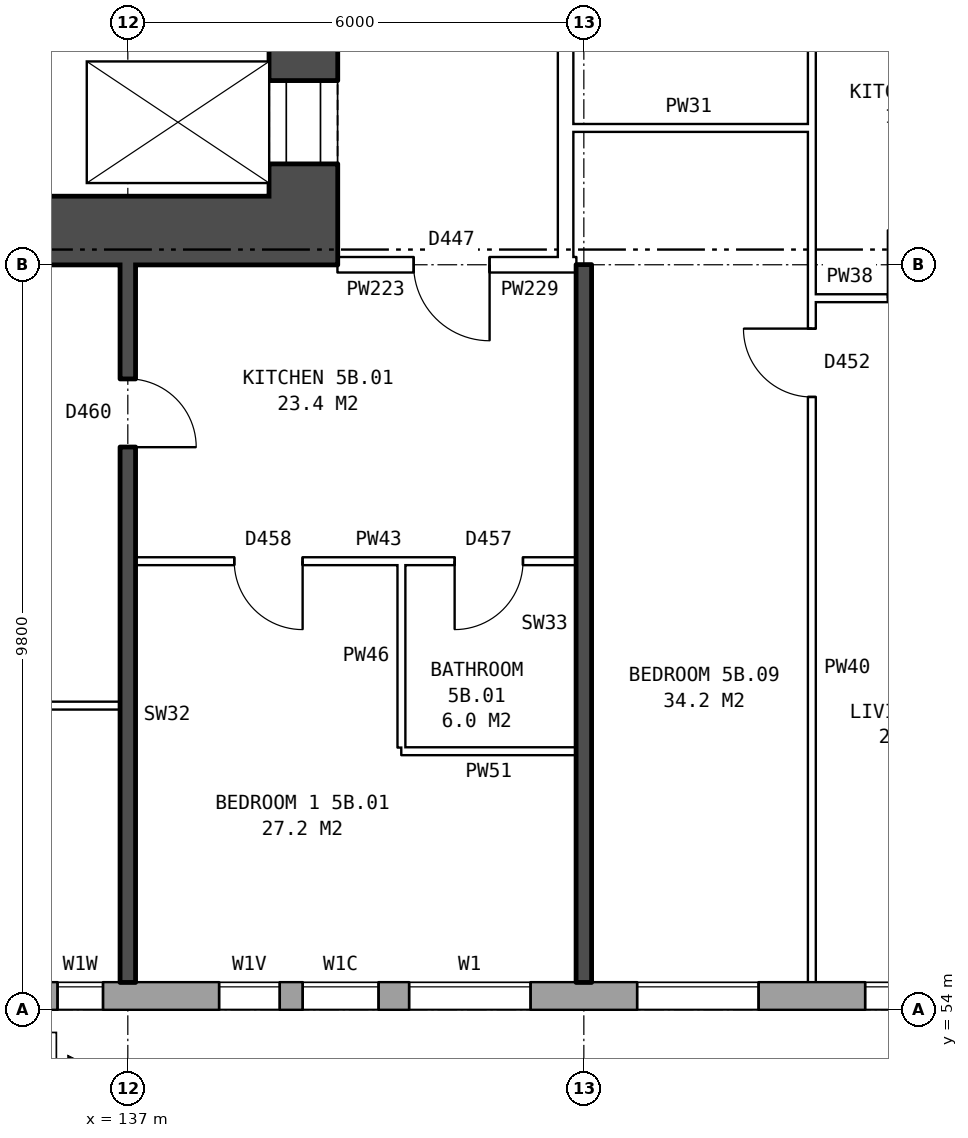
"""IFC4 building model, lengths in metres.
Left out: names, types, materials, properties, quantities, classifications, styles, units other than length and angle.
Written with IfcOpenShell. Run it as: python <this file> out.ifc"""

import sys

from ifc_helpers import new_model, si_unit, direction, frame, frame_2d, origin, place, context, subcontext, project, spatial, rectangle, extrude, element, fill, save


model = new_model("IFC4")
c1 = context("Model", 3, precision=1e-05, world=origin(), true_north=direction((0.0, 1.0)))
c2 = subcontext(c1, "Body", "Model", "MODEL_VIEW")
j1 = project(units=[si_unit("LENGTHUNIT", "METRE"), si_unit("PLANEANGLEUNIT", "RADIAN")], contexts=[c1])
p1 = place(None, origin())
s1 = spatial("IfcSite", under=j1, at=p1, CompositionType="ELEMENT")
p2 = place(p1, origin())
s2 = spatial("IfcBuilding", under=s1, at=p2, CompositionType="ELEMENT")
p3 = place(p2, frame((0.0, 0.0, 22.6)))
s3 = spatial("IfcBuildingStorey", under=s2, at=p3, CompositionType="ELEMENT", Elevation=22.6)
p4 = place(p3, frame((134.075, 54.18, 0.0), z_axis=(0.0, 0.0, 1.0), x_axis=(1.0, 0.0, 0.0)))
e1 = element("IfcWall", 1, at=p4, inside=s3, PredefinedType="STANDARD", context=c2, shape_type="SweptSolid", body=[
    extrude(rectangle(XDim=40.601, YDim=0.36, at=frame_2d((20.3, 0.0))), origin(), (0.0, 0.0, 1.0), 2.85),
])
p5 = place(p4, frame((0.3, 0.0, 0.8)))
e2 = element("IfcOpeningElement", 2, at=p5, cuts=e1, PredefinedType="OPENING", context=c2, shape_type="SweptSolid", body=[
    extrude(rectangle(XDim=1.4, YDim=1.8, at=frame_2d((0.7, 0.9))), frame((0.0, 0.19, 0.0), z_axis=(0.0, -1.0, 0.0), x_axis=(1.0, 0.0, 0.0)), (0.0, 0.0, 1.0), 0.38),
])
p6 = place(p4, frame((4.125, 0.0, 0.8)))
e3 = element("IfcOpeningElement", 3, at=p6, cuts=e1, PredefinedType="OPENING", context=c2, shape_type="SweptSolid", body=[
    extrude(rectangle(XDim=0.8, YDim=0.9, at=frame_2d((0.4, 0.45))), frame((0.0, 0.19, 0.0), z_axis=(0.0, -1.0, 0.0), x_axis=(1.0, 0.0, 0.0)), (0.0, 0.0, 1.0), 0.38),
])
p7 = place(p4, frame((6.625, 0.0, 0.8)))
e4 = element("IfcOpeningElement", 4, at=p7, cuts=e1, PredefinedType="OPENING", context=c2, shape_type="SweptSolid", body=[
    extrude(rectangle(XDim=1.6, YDim=1.8, at=frame_2d((0.8, 0.9))), frame((0.0, 0.19, 0.0), z_axis=(0.0, -1.0, 0.0), x_axis=(1.0, 0.0, 0.0)), (0.0, 0.0, 1.0), 0.38),
])
p8 = place(p4, frame((9.625, 0.0, 0.8)))
e5 = element("IfcOpeningElement", 5, at=p8, cuts=e1, PredefinedType="OPENING", context=c2, shape_type="SweptSolid", body=[
    extrude(rectangle(XDim=1.6, YDim=1.8, at=frame_2d((0.8, 0.9))), frame((0.0, 0.19, 0.0), z_axis=(0.0, -1.0, 0.0), x_axis=(1.0, 0.0, 0.0)), (0.0, 0.0, 1.0), 0.38),
])
p9 = place(p4, frame((12.625, 0.0, 0.8)))
e6 = element("IfcOpeningElement", 6, at=p9, cuts=e1, PredefinedType="OPENING", context=c2, shape_type="SweptSolid", body=[
    extrude(rectangle(XDim=1.6, YDim=1.8, at=frame_2d((0.8, 0.9))), frame((0.0, 0.19, 0.0), z_axis=(0.0, -1.0, 0.0), x_axis=(1.0, 0.0, 0.0)), (0.0, 0.0, 1.0), 0.38),
])
p10 = place(p4, frame((15.625, 0.0, 0.8)))
e7 = element("IfcOpeningElement", 7, at=p10, cuts=e1, PredefinedType="OPENING", context=c2, shape_type="SweptSolid", body=[
    extrude(rectangle(XDim=1.6, YDim=1.8, at=frame_2d((0.8, 0.9))), frame((0.0, 0.19, 0.0), z_axis=(0.0, -1.0, 0.0), x_axis=(1.0, 0.0, 0.0)), (0.0, 0.0, 1.0), 0.38),
])
p11 = place(p4, frame((18.625, 0.0, 0.8)))
e8 = element("IfcOpeningElement", 8, at=p11, cuts=e1, PredefinedType="OPENING", context=c2, shape_type="SweptSolid", body=[
    extrude(rectangle(XDim=1.6, YDim=1.8, at=frame_2d((0.8, 0.9))), frame((0.0, 0.19, 0.0), z_axis=(0.0, -1.0, 0.0), x_axis=(1.0, 0.0, 0.0)), (0.0, 0.0, 1.0), 0.38),
])
p12 = place(p4, frame((21.625, 0.0, 0.8)))
e9 = element("IfcOpeningElement", 9, at=p12, cuts=e1, PredefinedType="OPENING", context=c2, shape_type="SweptSolid", body=[
    extrude(rectangle(XDim=1.6, YDim=1.8, at=frame_2d((0.8, 0.9))), frame((0.0, 0.19, 0.0), z_axis=(0.0, -1.0, 0.0), x_axis=(1.0, 0.0, 0.0)), (0.0, 0.0, 1.0), 0.38),
])
p13 = place(p4, frame((24.625, 0.0, 0.8)))
e10 = element("IfcOpeningElement", 10, at=p13, cuts=e1, PredefinedType="OPENING", context=c2, shape_type="SweptSolid", body=[
    extrude(rectangle(XDim=1.6, YDim=1.8, at=frame_2d((0.8, 0.9))), frame((0.0, 0.19, 0.0), z_axis=(0.0, -1.0, 0.0), x_axis=(1.0, 0.0, 0.0)), (0.0, 0.0, 1.0), 0.38),
])
p14 = place(p4, frame((27.625, 0.0, 0.8)))
e11 = element("IfcOpeningElement", 11, at=p14, cuts=e1, PredefinedType="OPENING", context=c2, shape_type="SweptSolid", body=[
    extrude(rectangle(XDim=1.6, YDim=1.8, at=frame_2d((0.8, 0.9))), frame((0.0, 0.19, 0.0), z_axis=(0.0, -1.0, 0.0), x_axis=(1.0, 0.0, 0.0)), (0.0, 0.0, 1.0), 0.38),
])
p15 = place(p4, frame((30.625, 0.0, 0.8)))
e12 = element("IfcOpeningElement", 12, at=p15, cuts=e1, PredefinedType="OPENING", context=c2, shape_type="SweptSolid", body=[
    extrude(rectangle(XDim=1.6, YDim=1.8, at=frame_2d((0.8, 0.9))), frame((0.0, 0.19, 0.0), z_axis=(0.0, -1.0, 0.0), x_axis=(1.0, 0.0, 0.0)), (0.0, 0.0, 1.0), 0.38),
])
p16 = place(p4, frame((33.625, 0.0, 0.8)))
e13 = element("IfcOpeningElement", 13, at=p16, cuts=e1, PredefinedType="OPENING", context=c2, shape_type="SweptSolid", body=[
    extrude(rectangle(XDim=1.6, YDim=1.8, at=frame_2d((0.8, 0.9))), frame((0.0, 0.19, 0.0), z_axis=(0.0, -1.0, 0.0), x_axis=(1.0, 0.0, 0.0)), (0.0, 0.0, 1.0), 0.38),
])
p17 = place(p4, frame((35.525, 0.0, 0.8)))
e14 = element("IfcOpeningElement", 14, at=p17, cuts=e1, PredefinedType="OPENING", context=c2, shape_type="SweptSolid", body=[
    extrude(rectangle(XDim=0.6, YDim=1.2, at=frame_2d((0.3, 0.6))), frame((0.0, 0.19, 0.0), z_axis=(0.0, -1.0, 0.0), x_axis=(1.0, 0.0, 0.0)), (0.0, 0.0, 1.0), 0.38),
])
p18 = place(p4, frame((2.0, 0.0, 1.5)))
e15 = element("IfcOpeningElement", 15, at=p18, cuts=e1, PredefinedType="OPENING", context=c2, shape_type="SweptSolid", body=[
    extrude(rectangle(XDim=0.6, YDim=0.9, at=frame_2d((0.3, 0.45))), frame((0.0, 0.19, 0.0), z_axis=(0.0, -1.0, 0.0), x_axis=(1.0, 0.0, 0.0)), (0.0, 0.0, 1.0), 0.38),
])
p19 = place(p4, frame((5.225, 0.0, 0.8)))
e16 = element("IfcOpeningElement", 16, at=p19, cuts=e1, PredefinedType="OPENING", context=c2, shape_type="SweptSolid", body=[
    extrude(rectangle(XDim=1.0, YDim=1.8, at=frame_2d((0.5, 0.9))), frame((0.0, 0.19, 0.0), z_axis=(0.0, -1.0, 0.0), x_axis=(1.0, 0.0, 0.0)), (0.0, 0.0, 1.0), 0.38),
])
p20 = place(p4, frame((37.725, 0.0, 1.7)))
e17 = element("IfcOpeningElement", 17, at=p20, cuts=e1, PredefinedType="OPENING", context=c2, shape_type="SweptSolid", body=[
    extrude(rectangle(XDim=1.0, YDim=0.9, at=frame_2d((0.5, 0.45))), frame((0.0, 0.19, 0.0), z_axis=(0.0, -1.0, 0.0), x_axis=(1.0, 0.0, 0.0)), (0.0, 0.0, 1.0), 0.38),
])
p21 = place(p3, frame((139.31, 64.7, 0.0), z_axis=(0.0, 0.0, 1.0), x_axis=(0.0, 1.0, 0.0)))
e18 = element("IfcWall", 18, at=p21, inside=s3, PredefinedType="SHEAR", context=c2, shape_type="SweptSolid", body=[
    extrude(rectangle(XDim=10.6, YDim=0.9, at=frame_2d((5.3, 0.0))), origin(), (0.0, 0.0, 1.0), 2.85),
])
p22 = place(p21, frame((0.425, 0.0, 0.0)))
e19 = element("IfcOpeningElement", 19, at=p22, cuts=e18, PredefinedType="OPENING", context=c2, shape_type="SweptSolid", body=[
    extrude(rectangle(XDim=1.1, YDim=2.1, at=frame_2d((0.55, 1.05))), frame((0.0, 0.46, 0.0), z_axis=(0.0, -1.0, 0.0), x_axis=(1.0, 0.0, 0.0)), (0.0, 0.0, 1.0), 0.92),
])
p23 = place(p21, frame((9.0, 0.0, 0.0)))
e20 = element("IfcOpeningElement", 20, at=p23, cuts=e18, PredefinedType="OPENING", context=c2, shape_type="SweptSolid", body=[
    extrude(rectangle(XDim=1.1, YDim=2.1, at=frame_2d((0.55, 1.05))), frame((0.0, 0.46, 0.0), z_axis=(0.0, -1.0, 0.0), x_axis=(1.0, 0.0, 0.0)), (0.0, 0.0, 1.0), 0.92),
])
p24 = place(p21, frame((7.225, 0.0, 0.0)))
e21 = element("IfcOpeningElement", 21, at=p24, cuts=e18, PredefinedType="OPENING", context=c2, shape_type="SweptSolid", body=[
    extrude(rectangle(XDim=0.85, YDim=2.1, at=frame_2d((0.425, 1.05))), frame((0.0, 0.46, 0.0), z_axis=(0.0, -1.0, 0.0), x_axis=(1.0, 0.0, 0.0)), (0.0, 0.0, 1.0), 0.92),
])
p25 = place(p3, frame((139.76, 64.25, 0.0), z_axis=(0.0, 0.0, 1.0), x_axis=(-1.0, 0.0, 0.0)))
e22 = element("IfcWall", 22, at=p25, inside=s3, PredefinedType="SHEAR", context=c2, shape_type="SweptSolid", body=[
    extrude(rectangle(XDim=8.4, YDim=0.9, at=frame_2d((4.2, 0.0))), origin(), (0.0, 0.0, 1.0), 2.85),
])
p26 = place(p3, frame((142.76, 63.9, 0.0), z_axis=(0.0, 0.0, 1.0), x_axis=(0.0, 1.0, 0.0)))
e23 = element("IfcWall", 23, at=p26, inside=s3, PredefinedType="PARTITIONING", context=c2, shape_type="SweptSolid", body=[
    extrude(rectangle(XDim=12.2, YDim=0.2, at=frame_2d((6.1, 0.0))), origin(), (0.0, 0.0, 1.0), 2.85),
])
p27 = place(p26, frame((5.1, 0.0, 0.0)))
e24 = element("IfcOpeningElement", 24, at=p27, cuts=e23, PredefinedType="OPENING", context=c2, shape_type="SweptSolid", body=[
    extrude(rectangle(XDim=2.0, YDim=2.1, at=frame_2d((1.0, 1.05))), frame((0.0, 0.11, 0.0), z_axis=(0.0, -1.0, 0.0), x_axis=(1.0, 0.0, 0.0)), (0.0, 0.0, 1.0), 0.22),
])
p28 = place(p3, frame((140.6, 57.4, 0.0), z_axis=(0.0, 0.0, 1.0), x_axis=(1.0, 0.0, 0.0)))
e25 = element("IfcWall", 25, at=p28, inside=s3, PredefinedType="PARTITIONING", context=c2, shape_type="SweptSolid", body=[
    extrude(rectangle(XDim=2.3, YDim=0.1, at=frame_2d((1.15, 0.0))), origin(), (0.0, 0.0, 1.0), 2.85),
])
p29 = place(p3, frame((131.36, 58.0, 0.0), z_axis=(0.0, 0.0, 1.0), x_axis=(1.0, 0.0, 0.0)))
e26 = element("IfcWall", 26, at=p29, inside=s3, PredefinedType="PARTITIONING", context=c2, shape_type="SweptSolid", body=[
    extrude(rectangle(XDim=5.54, YDim=0.1, at=frame_2d((2.77, 0.0))), origin(), (0.0, 0.0, 1.0), 2.85),
])
p30 = place(p29, frame((2.32, 0.0, 0.0)))
e27 = element("IfcOpeningElement", 27, at=p30, cuts=e26, PredefinedType="OPENING", context=c2, shape_type="SweptSolid", body=[
    extrude(rectangle(XDim=0.9, YDim=2.1, at=frame_2d((0.45, 1.05))), frame((0.0, 0.06, 0.0), z_axis=(0.0, -1.0, 0.0), x_axis=(1.0, 0.0, 0.0)), (0.0, 0.0, 1.0), 0.12),
])
p31 = place(p3, frame((137.1, 59.9, 0.0), z_axis=(0.0, 0.0, 1.0), x_axis=(1.0, 0.0, 0.0)))
e28 = element("IfcWall", 28, at=p31, inside=s3, PredefinedType="PARTITIONING", context=c2, shape_type="SweptSolid", body=[
    extrude(rectangle(XDim=5.8, YDim=0.1, at=frame_2d((2.9, 0.0))), origin(), (0.0, 0.0, 1.0), 2.85),
])
p32 = place(p31, frame((1.3, 0.0, 0.0)))
e29 = element("IfcOpeningElement", 29, at=p32, cuts=e28, PredefinedType="OPENING", context=c2, shape_type="SweptSolid", body=[
    extrude(rectangle(XDim=0.9, YDim=2.1, at=frame_2d((0.45, 1.05))), frame((0.0, 0.06, 0.0), z_axis=(0.0, -1.0, 0.0), x_axis=(1.0, 0.0, 0.0)), (0.0, 0.0, 1.0), 0.12),
])
p33 = place(p31, frame((4.2, 0.0, 0.0)))
e30 = element("IfcOpeningElement", 30, at=p33, cuts=e28, PredefinedType="OPENING", context=c2, shape_type="SweptSolid", body=[
    extrude(rectangle(XDim=0.9, YDim=2.1, at=frame_2d((0.45, 1.05))), frame((0.0, 0.06, 0.0), z_axis=(0.0, -1.0, 0.0), x_axis=(1.0, 0.0, 0.0)), (0.0, 0.0, 1.0), 0.12),
])
p34 = place(p3, frame((146.0, 63.36, 0.0), z_axis=(0.0, 0.0, 1.0), x_axis=(1.0, 0.0, 0.0)))
e31 = element("IfcWall", 31, at=p34, inside=s3, PredefinedType="PARTITIONING", context=c2, shape_type="SweptSolid", body=[
    extrude(rectangle(XDim=2.9, YDim=0.1, at=frame_2d((1.45, 0.0))), origin(), (0.0, 0.0, 1.0), 2.85),
])
p35 = place(p34, frame((1.0, 0.0, 0.0)))
e32 = element("IfcOpeningElement", 32, at=p35, cuts=e31, PredefinedType="OPENING", context=c2, shape_type="SweptSolid", body=[
    extrude(rectangle(XDim=0.9, YDim=2.1, at=frame_2d((0.45, 1.05))), frame((0.0, 0.06, 0.0), z_axis=(0.0, -1.0, 0.0), x_axis=(1.0, 0.0, 0.0)), (0.0, 0.0, 1.0), 0.12),
])
p36 = place(p3, frame((139.76, 63.8, 0.0), z_axis=(0.0, 0.0, 1.0), x_axis=(1.0, 0.0, 0.0)))
e33 = element("IfcWall", 33, at=p36, inside=s3, PredefinedType="PARTITIONING", context=c2, shape_type="SweptSolid", body=[
    extrude(rectangle(XDim=3.0, YDim=0.2, at=frame_2d((1.5, 0.0))), origin(), (0.0, 0.0, 1.0), 2.85),
])
p37 = place(p36, frame((1.0, 0.0, 0.0)))
e34 = element("IfcOpeningElement", 34, at=p37, cuts=e33, PredefinedType="OPENING", context=c2, shape_type="SweptSolid", body=[
    extrude(rectangle(XDim=1.0, YDim=2.1, at=frame_2d((0.5, 1.05))), frame((0.0, 0.11, 0.0), z_axis=(0.0, -1.0, 0.0), x_axis=(1.0, 0.0, 0.0)), (0.0, 0.0, 1.0), 0.22),
])
p38 = place(p3, frame((142.76, 63.8, 0.0), z_axis=(0.0, 0.0, 1.0), x_axis=(1.0, 0.0, 0.0)))
e35 = element("IfcWall", 35, at=p38, inside=s3, PredefinedType="PARTITIONING", context=c2, shape_type="SweptSolid", body=[
    extrude(rectangle(XDim=0.14, YDim=0.2, at=frame_2d((0.07, 0.0))), origin(), (0.0, 0.0, 1.0), 2.85),
])
p39 = place(p3, frame((142.76, 65.6, 0.0), z_axis=(0.0, 0.0, 1.0), x_axis=(1.0, 0.0, 0.0)))
e36 = element("IfcWall", 36, at=p39, inside=s3, PredefinedType="PARTITIONING", context=c2, shape_type="SweptSolid", body=[
    extrude(rectangle(XDim=3.24, YDim=0.1, at=frame_2d((1.62, 0.0))), origin(), (0.0, 0.0, 1.0), 2.85),
])
p40 = place(p3, frame((137.0, 54.36, 0.0), z_axis=(0.0, 0.0, 1.0), x_axis=(0.0, 1.0, 0.0)))
e37 = element("IfcWall", 37, at=p40, inside=s3, PredefinedType="SOLIDWALL", context=c2, shape_type="SweptSolid", body=[
    extrude(rectangle(XDim=9.44, YDim=0.2, at=frame_2d((4.72, 0.0))), origin(), (0.0, 0.0, 1.0), 2.85),
])
p41 = place(p40, frame((7.04, 0.0, 0.0)))
e38 = element("IfcOpeningElement", 38, at=p41, cuts=e37, PredefinedType="OPENING", context=c2, shape_type="SweptSolid", body=[
    extrude(rectangle(XDim=0.9, YDim=2.1, at=frame_2d((0.45, 1.05))), frame((0.0, 0.11, 0.0), z_axis=(0.0, -1.0, 0.0), x_axis=(1.0, 0.0, 0.0)), (0.0, 0.0, 1.0), 0.22),
])
p42 = place(p3, frame((140.6, 57.45, 0.0), z_axis=(0.0, 0.0, 1.0), x_axis=(0.0, 1.0, 0.0)))
e39 = element("IfcWall", 39, at=p42, inside=s3, PredefinedType="PARTITIONING", context=c2, shape_type="SweptSolid", body=[
    extrude(rectangle(XDim=2.4, YDim=0.1, at=frame_2d((1.2, 0.0))), origin(), (0.0, 0.0, 1.0), 2.85),
])
p43 = place(p3, frame((143.0, 54.36, 0.0), z_axis=(0.0, 0.0, 1.0), x_axis=(0.0, 1.0, 0.0)))
e40 = element("IfcWall", 40, at=p43, inside=s3, PredefinedType="SOLIDWALL", context=c2, shape_type="SweptSolid", body=[
    extrude(rectangle(XDim=9.44, YDim=0.2, at=frame_2d((4.72, 0.0))), origin(), (0.0, 0.0, 1.0), 2.85),
])
p44 = place(p3, frame((146.0, 54.36, 0.0), z_axis=(0.0, 0.0, 1.0), x_axis=(0.0, 1.0, 0.0)))
e41 = element("IfcWall", 41, at=p44, inside=s3, PredefinedType="PARTITIONING", context=c2, shape_type="SweptSolid", body=[
    extrude(rectangle(XDim=14.34, YDim=0.1, at=frame_2d((7.17, 0.0))), origin(), (0.0, 0.0, 1.0), 2.85),
])
p45 = place(p44, frame((7.7, 0.0, 0.0)))
e42 = element("IfcOpeningElement", 42, at=p45, cuts=e41, PredefinedType="OPENING", context=c2, shape_type="SweptSolid", body=[
    extrude(rectangle(XDim=0.9, YDim=2.1, at=frame_2d((0.45, 1.05))), frame((0.0, 0.06, 0.0), z_axis=(0.0, -1.0, 0.0), x_axis=(1.0, 0.0, 0.0)), (0.0, 0.0, 1.0), 0.12),
])
p46 = place(p44, frame((13.04, 0.0, 0.0)))
e43 = element("IfcOpeningElement", 43, at=p46, cuts=e41, PredefinedType="OPENING", context=c2, shape_type="SweptSolid", body=[
    extrude(rectangle(XDim=0.9, YDim=2.1, at=frame_2d((0.45, 1.05))), frame((0.0, 0.06, 0.0), z_axis=(0.0, -1.0, 0.0), x_axis=(1.0, 0.0, 0.0)), (0.0, 0.0, 1.0), 0.12),
])
p47 = place(p6, origin())
e44 = element("IfcWindow", 44, at=p47, inside=s3, PartitioningType="SINGLE_PANEL", PredefinedType="WINDOW", context=c2, shape_type="SweptSolid", body=[
    extrude(rectangle(XDim=0.8, YDim=0.9, at=frame_2d((0.4, 0.45))), frame((0.0, 0.15, 0.0), z_axis=(0.0, -1.0, 0.0), x_axis=(1.0, 0.0, 0.0)), (0.0, 0.0, 1.0), 0.06),
])
fill(e3, e44)
p48 = place(p7, origin())
e45 = element("IfcWindow", 45, at=p48, inside=s3, PartitioningType="SINGLE_PANEL", PredefinedType="WINDOW", context=c2, shape_type="SweptSolid", body=[
    extrude(rectangle(XDim=1.6, YDim=1.8, at=frame_2d((0.8, 0.9))), frame((0.0, 0.15, 0.0), z_axis=(0.0, -1.0, 0.0), x_axis=(1.0, 0.0, 0.0)), (0.0, 0.0, 1.0), 0.06),
])
fill(e4, e45)
p49 = place(p8, origin())
e46 = element("IfcWindow", 46, at=p49, inside=s3, PartitioningType="SINGLE_PANEL", PredefinedType="WINDOW", context=c2, shape_type="SweptSolid", body=[
    extrude(rectangle(XDim=1.6, YDim=1.8, at=frame_2d((0.8, 0.9))), frame((0.0, 0.15, 0.0), z_axis=(0.0, -1.0, 0.0), x_axis=(1.0, 0.0, 0.0)), (0.0, 0.0, 1.0), 0.06),
])
fill(e5, e46)
p50 = place(p9, origin())
e47 = element("IfcWindow", 47, at=p50, inside=s3, PartitioningType="SINGLE_PANEL", PredefinedType="WINDOW", context=c2, shape_type="SweptSolid", body=[
    extrude(rectangle(XDim=1.6, YDim=1.8, at=frame_2d((0.8, 0.9))), frame((0.0, 0.15, 0.0), z_axis=(0.0, -1.0, 0.0), x_axis=(1.0, 0.0, 0.0)), (0.0, 0.0, 1.0), 0.06),
])
fill(e6, e47)
p51 = place(p22, origin())
e48 = element("IfcDoor", 48, at=p51, inside=s3, OperationType="DOUBLE_DOOR_SLIDING", PredefinedType="DOOR", context=c2, shape_type="SweptSolid", body=[
    extrude(rectangle(XDim=1.1, YDim=2.1, at=frame_2d((0.55, 1.05))), frame((0.0, 0.435, 0.0), z_axis=(0.0, -1.0, 0.0), x_axis=(1.0, 0.0, 0.0)), (0.0, 0.0, 1.0), 0.05),
])
fill(e19, e48)
p52 = place(p32, frame((0.9, 0.0, 0.0), z_axis=(0.0, 0.0, 1.0), x_axis=(-1.0, 0.0, 0.0)))
e49 = element("IfcDoor", 49, at=p52, inside=s3, OperationType="SINGLE_SWING_LEFT", PredefinedType="DOOR", context=c2, shape_type="SweptSolid", body=[
    extrude(rectangle(XDim=0.9, YDim=2.1, at=frame_2d((0.45, 1.05))), frame((0.0, 0.025, 0.0), z_axis=(0.0, -1.0, 0.0), x_axis=(1.0, 0.0, 0.0)), (0.0, 0.0, 1.0), 0.05),
])
fill(e29, e49)
p53 = place(p37, frame((1.0, 0.0, 0.0), z_axis=(0.0, 0.0, 1.0), x_axis=(-1.0, 0.0, 0.0)))
e50 = element("IfcDoor", 50, at=p53, inside=s3, OperationType="SINGLE_SWING_LEFT", PredefinedType="DOOR", context=c2, shape_type="SweptSolid", body=[
    extrude(rectangle(XDim=1.0, YDim=2.1, at=frame_2d((0.5, 1.05))), frame((0.0, 0.025, 0.0), z_axis=(0.0, -1.0, 0.0), x_axis=(1.0, 0.0, 0.0)), (0.0, 0.0, 1.0), 0.05),
])
fill(e34, e50)
p54 = place(p41, frame((0.9, 0.0, 0.0), z_axis=(0.0, 0.0, 1.0), x_axis=(-1.0, 0.0, 0.0)))
e51 = element("IfcDoor", 51, at=p54, inside=s3, OperationType="SINGLE_SWING_RIGHT", PredefinedType="DOOR", context=c2, shape_type="SweptSolid", body=[
    extrude(rectangle(XDim=0.9, YDim=2.1, at=frame_2d((0.45, 1.05))), frame((0.0, 0.025, 0.0), z_axis=(0.0, -1.0, 0.0), x_axis=(1.0, 0.0, 0.0)), (0.0, 0.0, 1.0), 0.05),
])
fill(e38, e51)
p55 = place(p33, frame((0.9, 0.0, 0.0), z_axis=(0.0, 0.0, 1.0), x_axis=(-1.0, 0.0, 0.0)))
e52 = element("IfcDoor", 52, at=p55, inside=s3, OperationType="SINGLE_SWING_RIGHT", PredefinedType="DOOR", context=c2, shape_type="SweptSolid", body=[
    extrude(rectangle(XDim=0.9, YDim=2.1, at=frame_2d((0.45, 1.05))), frame((0.0, 0.025, 0.0), z_axis=(0.0, -1.0, 0.0), x_axis=(1.0, 0.0, 0.0)), (0.0, 0.0, 1.0), 0.05),
])
fill(e30, e52)
p56 = place(p45, origin())
e53 = element("IfcDoor", 53, at=p56, inside=s3, OperationType="SINGLE_SWING_RIGHT", PredefinedType="DOOR", context=c2, shape_type="SweptSolid", body=[
    extrude(rectangle(XDim=0.9, YDim=2.1, at=frame_2d((0.45, 1.05))), frame((0.0, 0.025, 0.0), z_axis=(0.0, -1.0, 0.0), x_axis=(1.0, 0.0, 0.0)), (0.0, 0.0, 1.0), 0.05),
])
fill(e42, e53)
p57 = place(p18, origin())
e54 = element("IfcWindow", 54, at=p57, inside=s3, PartitioningType="SINGLE_PANEL", PredefinedType="WINDOW", context=c2, shape_type="SweptSolid", body=[
    extrude(rectangle(XDim=0.6, YDim=0.9, at=frame_2d((0.3, 0.45))), frame((0.0, 0.15, 0.0), z_axis=(0.0, -1.0, 0.0), x_axis=(1.0, 0.0, 0.0)), (0.0, 0.0, 1.0), 0.06),
])
fill(e15, e54)
p58 = place(p19, origin())
e55 = element("IfcWindow", 55, at=p58, inside=s3, PartitioningType="SINGLE_PANEL", PredefinedType="WINDOW", context=c2, shape_type="SweptSolid", body=[
    extrude(rectangle(XDim=1.0, YDim=1.8, at=frame_2d((0.5, 0.9))), frame((0.0, 0.15, 0.0), z_axis=(0.0, -1.0, 0.0), x_axis=(1.0, 0.0, 0.0)), (0.0, 0.0, 1.0), 0.06),
])
fill(e16, e55)
save(model, sys.argv[1])
